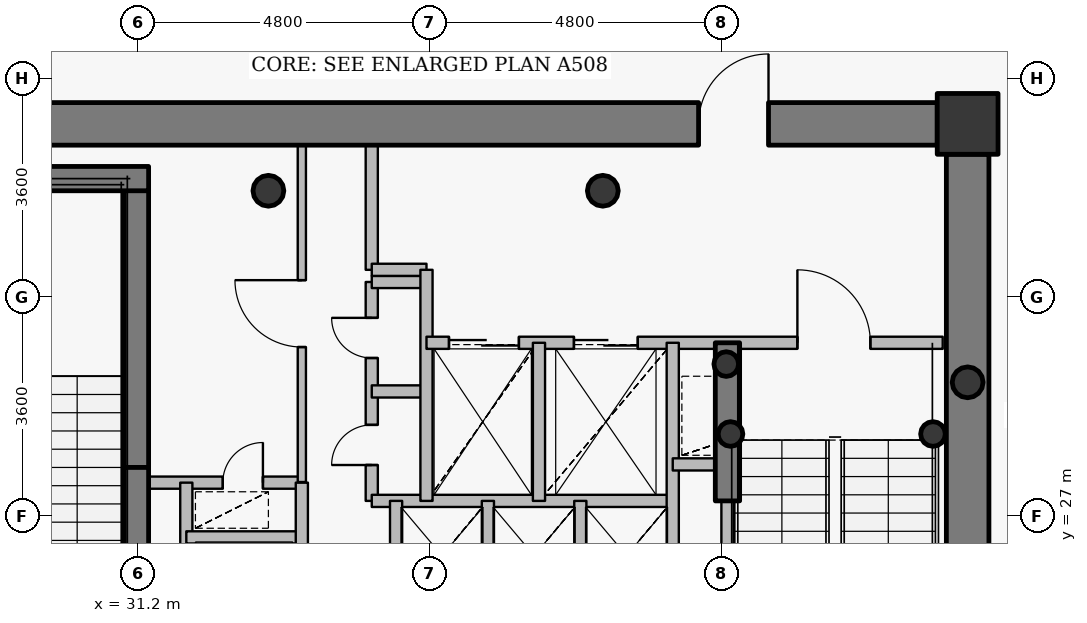
"""IFC4 building model, lengths in metres.
Left out: names, types, materials, properties, quantities, classifications, styles, units other than length and angle.
Written with IfcOpenShell. Run it as: python <this file> out.ifc"""

import sys

from ifc_helpers import new_model, si_unit, direction, frame, frame_2d, origin, origin_2d, place, context, subcontext, project, spatial, rectangle, hollow_circle, extrude, source, transform, mapped, element, fill, save


model = new_model("IFC4")
c1 = context("Model", 3, precision=1e-05, world=origin(), true_north=direction((0.0, 1.0)))
c2 = subcontext(c1, "Body", "Model", "MODEL_VIEW")
j1 = project(units=[si_unit("LENGTHUNIT", "METRE"), si_unit("PLANEANGLEUNIT", "RADIAN")], contexts=[c1])
p1 = place(None, origin())
s1 = spatial("IfcSite", under=j1, at=p1, CompositionType="ELEMENT")
p2 = place(p1, origin())
s2 = spatial("IfcBuilding", under=s1, at=p2, CompositionType="ELEMENT")
p3 = place(p2, frame((0.0, 0.0, 306.75)))
s3 = spatial("IfcBuildingStorey", under=s2, at=p3, CompositionType="ELEMENT", Elevation=306.75)
p4 = place(p3, frame((44.85, 33.45, 0.0), z_axis=(0.0, 0.0, 1.0), x_axis=(1.0, 0.0, 0.0)))
e1 = element("IfcColumn", 1, at=p4, inside=s3, PredefinedType="COLUMN", context=c2, shape_type="SweptSolid", body=[
    extrude(rectangle(XDim=1.0, YDim=1.0, at=origin_2d()), origin(), (0.0, 0.0, 1.0), 3.75),
])
for number, where, z_axis, x_axis in (
    (2, (38.85, 32.35, 0.0), (0.0, 0.0, 1.0), (1.0, 0.0, 0.0)),
    (3, (33.35, 32.35, 0.0), (0.0, 0.0, 1.0), (1.0, 0.0, 0.0)),
):
    element("IfcColumn", number, at=place(p3, frame(where, z_axis=z_axis, x_axis=x_axis)), inside=s3, PredefinedType="COLUMN", context=c2, shape_type="SweptSolid", body=[
        extrude(hollow_circle(Radius=0.254, WallThickness=0.02, at=origin_2d()), origin(), (0.0, 0.0, 1.0), 3.75),
    ])
p5 = place(p3, frame((31.18, 27.8, 0.0), z_axis=(0.0, 0.0, 1.0), x_axis=(0.0, 1.0, 0.0)))
e4 = element("IfcWall", 4, at=p5, inside=s3, PredefinedType="SHEAR", context=c2, shape_type="SweptSolid", body=[
    extrude(rectangle(XDim=4.75, YDim=0.4, at=frame_2d((2.375, 0.0))), origin(), (0.0, 0.0, 1.0), 3.75),
])
p6 = place(p3, frame((27.25, 32.55, 0.0), z_axis=(0.0, 0.0, 1.0), x_axis=(1.0, 0.0, 0.0)))
e5 = element("IfcWall", 5, at=p6, inside=s3, PredefinedType="SHEAR", context=c2, shape_type="SweptSolid", body=[
    extrude(rectangle(XDim=4.13, YDim=0.4, at=frame_2d((2.065, 0.0))), origin(), (0.0, 0.0, 1.0), 3.75),
])
for number, where, z_axis, x_axis in (
    (6, (40.95, 28.35, 0.0), (0.0, 0.0, 1.0), (1.0, 0.0, 0.0)),
    (7, (44.28, 28.35, 0.0), (0.0, 0.0, 1.0), (1.0, 0.0, 0.0)),
    (8, (40.88, 29.5, 0.0), (0.0, 0.0, 1.0), (1.0, 0.0, 0.0)),
):
    element("IfcColumn", number, at=place(p3, frame(where, z_axis=z_axis, x_axis=x_axis)), inside=s3, PredefinedType="COLUMN", context=c2, shape_type="SweptSolid", body=[
        extrude(hollow_circle(Radius=0.203, WallThickness=0.016, at=origin_2d()), origin(), (0.0, 0.0, 1.0), 3.75),
    ])
p7 = place(p3, frame((27.65, 33.45, 0.0), z_axis=(0.0, 0.0, 1.0), x_axis=(1.0, 0.0, 0.0)))
e9 = element("IfcWall", 9, at=p7, inside=s3, PredefinedType="SHEAR", context=c2, shape_type="SweptSolid", body=[
    extrude(rectangle(XDim=16.7, YDim=0.7, at=frame_2d((8.35, 0.0))), origin(), (0.0, 0.0, 1.0), 3.05),
])
p8 = place(p7, frame((12.775, 0.0, 0.0)))
e10 = element("IfcOpeningElement", 10, at=p8, cuts=e9, PredefinedType="OPENING", context=c2, shape_type="SweptSolid", body=[
    extrude(rectangle(XDim=1.15, YDim=2.15, at=origin_2d()), frame((0.575, 0.36, 1.075), z_axis=(0.0, -1.0, 0.0), x_axis=(1.0, 0.0, 0.0)), (0.0, 0.0, 1.0), 0.72),
])
p9 = place(p3, frame((44.85, 32.95, 0.0), z_axis=(0.0, 0.0, 1.0), x_axis=(0.0, -1.0, 0.0)))
e11 = element("IfcWall", 11, at=p9, inside=s3, PredefinedType="SHEAR", context=c2, shape_type="SweptSolid", body=[
    extrude(rectangle(XDim=11.9, YDim=0.7, at=frame_2d((5.95, 0.0))), origin(), (0.0, 0.0, 1.0), 3.05),
])
p10 = place(p3, frame((31.18, 25.55, 0.0), z_axis=(0.0, 0.0, 1.0), x_axis=(0.0, 1.0, 0.0)))
e12 = element("IfcWall", 12, at=p10, inside=s3, PredefinedType="SHEAR", context=c2, shape_type="SweptSolid", body=[
    extrude(rectangle(XDim=2.25, YDim=0.4, at=frame_2d((1.125, 0.0))), origin(), (0.0, 0.0, 1.0), 3.1),
])
p11 = place(p3, frame((40.9, 27.25, 0.0), z_axis=(0.0, 0.0, 1.0), x_axis=(0.0, 1.0, 0.0)))
e13 = element("IfcWall", 13, at=p11, inside=s3, PredefinedType="SHEAR", context=c2, shape_type="SweptSolid", body=[
    extrude(rectangle(XDim=2.6, YDim=0.4, at=frame_2d((1.3, 0.0))), origin(), (0.0, 0.0, 1.0), 3.1),
])
p12 = place(p3, frame((44.85, 29.2, 0.0), z_axis=(0.0, 0.0, 1.0), x_axis=(1.0, 0.0, 0.0)))
e14 = element("IfcColumn", 14, at=p12, inside=s3, PredefinedType="COLUMN", context=c2, shape_type="SweptSolid", body=[
    extrude(hollow_circle(Radius=0.254, WallThickness=0.02, at=origin_2d()), origin(), (0.0, 0.0, 1.0), 3.75),
])
p13 = place(p3, frame((31.1, 27.55, 0.0), z_axis=(0.0, 0.0, 1.0), x_axis=(1.0, 0.0, 0.0)))
e15 = element("IfcWall", 15, at=p13, inside=s3, PredefinedType="PARTITIONING", context=c2, shape_type="SweptSolid", body=[
    extrude(rectangle(XDim=2.8, YDim=0.2, at=frame_2d((1.4, 0.0))), origin(), (0.0, 0.0, 1.0), 3.085),
])
p14 = place(p13, frame((1.5, 0.0, 0.0)))
e16 = element("IfcOpeningElement", 16, at=p14, cuts=e15, PredefinedType="OPENING", context=c2, shape_type="SweptSolid", body=[
    extrude(rectangle(XDim=0.66, YDim=2.05, at=origin_2d()), frame((0.33, 0.11, 1.025), z_axis=(0.0, -1.0, 0.0), x_axis=(1.0, 0.0, 0.0)), (0.0, 0.0, 1.0), 0.22),
])
p15 = place(p3, frame((32.0, 24.1, 0.0), z_axis=(0.0, 0.0, 1.0), x_axis=(0.0, 1.0, 0.0)))
e17 = element("IfcWall", 17, at=p15, inside=s3, PredefinedType="PARTITIONING", context=c2, shape_type="SweptSolid", body=[
    extrude(rectangle(XDim=3.45, YDim=0.2, at=frame_2d((1.725, 0.0))), origin(), (0.0, 0.0, 1.0), 3.5),
])
p16 = place(p3, frame((32.0, 26.65, 0.0), z_axis=(0.0, 0.0, 1.0), x_axis=(1.0, 0.0, 0.0)))
e18 = element("IfcWall", 18, at=p16, inside=s3, PredefinedType="PARTITIONING", context=c2, shape_type="SweptSolid", body=[
    extrude(rectangle(XDim=1.9, YDim=0.2, at=frame_2d((0.95, 0.0))), origin(), (0.0, 0.0, 1.0), 3.085),
])
p17 = place(p3, frame((33.9, 20.9, 0.0), z_axis=(0.0, 0.0, 1.0), x_axis=(0.0, 1.0, 0.0)))
e19 = element("IfcWall", 19, at=p17, inside=s3, PredefinedType="PARTITIONING", context=c2, shape_type="SweptSolid", body=[
    extrude(rectangle(XDim=6.65, YDim=0.2, at=frame_2d((3.325, 0.0))), origin(), (0.0, 0.0, 1.0), 3.085),
])
p18 = place(p3, frame((33.9, 27.56, 0.0), z_axis=(0.0, 0.0, 1.0), x_axis=(0.0, 1.0, 0.0)))
e20 = element("IfcWall", 20, at=p18, inside=s3, PredefinedType="PARTITIONING", context=c2, shape_type="SweptSolid", body=[
    extrude(rectangle(XDim=5.54, YDim=0.135, at=frame_2d((2.77, 0.0))), origin(), (0.0, 0.0, 1.0), 3.085),
])
p19 = place(p18, frame((2.22, 0.0, 0.0)))
e21 = element("IfcOpeningElement", 21, at=p19, cuts=e20, PredefinedType="OPENING", context=c2, shape_type="SweptSolid", body=[
    extrude(rectangle(XDim=1.1, YDim=2.15, at=origin_2d()), frame((0.55, 0.078, 1.075), z_axis=(0.0, -1.0, 0.0), x_axis=(1.0, 0.0, 0.0)), (0.0, 0.0, 1.0), 0.155),
])
p20 = place(p3, frame((35.05, 27.25, 0.0), z_axis=(0.0, 0.0, 1.0), x_axis=(0.0, 1.0, 0.0)))
e22 = element("IfcWall", 22, at=p20, inside=s3, PredefinedType="PARTITIONING", context=c2, shape_type="SweptSolid", body=[
    extrude(rectangle(XDim=3.6, YDim=0.2, at=frame_2d((1.8, 0.0))), origin(), (0.0, 0.0, 1.0), 3.5),
])
p21 = place(p20, frame((0.59, 0.0, 0.0)))
e23 = element("IfcOpeningElement", 23, at=p21, cuts=e22, PredefinedType="OPENING", context=c2, shape_type="SweptSolid", body=[
    extrude(rectangle(XDim=0.66, YDim=2.05, at=origin_2d()), frame((0.33, 0.11, 1.025), z_axis=(0.0, -1.0, 0.0), x_axis=(1.0, 0.0, 0.0)), (0.0, 0.0, 1.0), 0.22),
])
p22 = place(p20, frame((2.35, 0.0, 0.0)))
e24 = element("IfcOpeningElement", 24, at=p22, cuts=e22, PredefinedType="OPENING", context=c2, shape_type="SweptSolid", body=[
    extrude(rectangle(XDim=0.66, YDim=2.05, at=origin_2d()), frame((0.33, 0.11, 1.025), z_axis=(0.0, -1.0, 0.0), x_axis=(1.0, 0.0, 0.0)), (0.0, 0.0, 1.0), 0.22),
])
p23 = place(p3, frame((35.05, 27.25, 0.0), z_axis=(0.0, 0.0, 1.0), x_axis=(1.0, 0.0, 0.0)))
e25 = element("IfcWall", 25, at=p23, inside=s3, PredefinedType="PARTITIONING", context=c2, shape_type="SweptSolid", body=[
    extrude(rectangle(XDim=4.95, YDim=0.2, at=frame_2d((2.475, 0.0))), origin(), (0.0, 0.0, 1.0), 3.085),
])
for number, where, z_axis, x_axis in (
    (26, (35.05, 29.05, 0.0), (0.0, 0.0, 1.0), (1.0, 0.0, 0.0)),
    (27, (35.05, 30.85, 0.0), (0.0, 0.0, 1.0), (1.0, 0.0, 0.0)),
):
    element("IfcWall", number, at=place(p3, frame(where, z_axis=z_axis, x_axis=x_axis)), inside=s3, PredefinedType="PARTITIONING", context=c2, shape_type="SweptSolid", body=[
        extrude(rectangle(XDim=0.9, YDim=0.2, at=frame_2d((0.45, 0.0))), origin(), (0.0, 0.0, 1.0), 3.5),
    ])
p24 = place(p3, frame((35.05, 31.05, 0.0), z_axis=(0.0, 0.0, 1.0), x_axis=(0.0, 1.0, 0.0)))
e28 = element("IfcWall", 28, at=p24, inside=s3, PredefinedType="PARTITIONING", context=c2, shape_type="SweptSolid", body=[
    extrude(rectangle(XDim=2.05, YDim=0.2, at=frame_2d((1.025, 0.0))), origin(), (0.0, 0.0, 1.0), 3.085),
])
p25 = place(p3, frame((35.05, 31.05, 0.0), z_axis=(0.0, 0.0, 1.0), x_axis=(1.0, 0.0, 0.0)))
e29 = element("IfcWall", 29, at=p25, inside=s3, PredefinedType="PARTITIONING", context=c2, shape_type="SweptSolid", body=[
    extrude(rectangle(XDim=0.9, YDim=0.2, at=frame_2d((0.45, 0.0))), origin(), (0.0, 0.0, 1.0), 3.5),
])
p26 = place(p3, frame((35.45, 25.45, 0.0), z_axis=(0.0, 0.0, 1.0), x_axis=(0.0, 1.0, 0.0)))
e30 = element("IfcWall", 30, at=p26, inside=s3, PredefinedType="PARTITIONING", context=c2, shape_type="SweptSolid", body=[
    extrude(rectangle(XDim=1.8, YDim=0.2, at=frame_2d((0.9, 0.0))), origin(), (0.0, 0.0, 1.0), 3.5),
])
p27 = place(p3, frame((35.95, 27.25, 0.0), z_axis=(0.0, 0.0, 1.0), x_axis=(0.0, 1.0, 0.0)))
e31 = element("IfcWall", 31, at=p27, inside=s3, PredefinedType="PARTITIONING", context=c2, shape_type="SweptSolid", body=[
    extrude(rectangle(XDim=3.8, YDim=0.2, at=frame_2d((1.9, 0.0))), origin(), (0.0, 0.0, 1.0), 3.5),
])
p28 = place(p3, frame((35.95, 29.85, 0.0), z_axis=(0.0, 0.0, 1.0), x_axis=(1.0, 0.0, 0.0)))
e32 = element("IfcWall", 32, at=p28, inside=s3, PredefinedType="PARTITIONING", context=c2, shape_type="SweptSolid", body=[
    extrude(rectangle(XDim=8.49, YDim=0.2, at=frame_2d((4.245, 0.0))), origin(), (0.0, 0.0, 1.0), 3.085),
])
p29 = place(p28, frame((6.1, 0.0, 0.0)))
e33 = element("IfcOpeningElement", 33, at=p29, cuts=e32, PredefinedType="OPENING", context=c2, shape_type="SweptSolid", body=[
    extrude(rectangle(XDim=1.2, YDim=2.15, at=origin_2d()), frame((0.6, 0.11, 1.075), z_axis=(0.0, -1.0, 0.0), x_axis=(1.0, 0.0, 0.0)), (0.0, 0.0, 1.0), 0.22),
])
p30 = place(p28, frame((0.37, 0.0, 0.0)))
e34 = element("IfcOpeningElement", 34, at=p30, cuts=e32, PredefinedType="OPENING", context=c2, shape_type="SweptSolid", body=[
    extrude(rectangle(XDim=1.15, YDim=2.15, at=origin_2d()), frame((0.575, 0.11, 1.075), z_axis=(0.0, -1.0, 0.0), x_axis=(1.0, 0.0, 0.0)), (0.0, 0.0, 1.0), 0.22),
])
p31 = place(p28, frame((2.425, 0.0, 0.0)))
e35 = element("IfcOpeningElement", 35, at=p31, cuts=e32, PredefinedType="OPENING", context=c2, shape_type="SweptSolid", body=[
    extrude(rectangle(XDim=1.05, YDim=2.15, at=origin_2d()), frame((0.525, 0.11, 1.075), z_axis=(0.0, -1.0, 0.0), x_axis=(1.0, 0.0, 0.0)), (0.0, 0.0, 1.0), 0.22),
])
p32 = place(p3, frame((36.96, 25.45, 0.0), z_axis=(0.0, 0.0, 1.0), x_axis=(0.0, 1.0, 0.0)))
e36 = element("IfcWall", 36, at=p32, inside=s3, PredefinedType="PARTITIONING", context=c2, shape_type="SweptSolid", body=[
    extrude(rectangle(XDim=1.8, YDim=0.2, at=frame_2d((0.9, 0.0))), origin(), (0.0, 0.0, 1.0), 3.5),
])
p33 = place(p3, frame((37.8, 27.25, 0.0), z_axis=(0.0, 0.0, 1.0), x_axis=(0.0, 1.0, 0.0)))
e37 = element("IfcWall", 37, at=p33, inside=s3, PredefinedType="PARTITIONING", context=c2, shape_type="SweptSolid", body=[
    extrude(rectangle(XDim=2.6, YDim=0.2, at=frame_2d((1.3, 0.0))), origin(), (0.0, 0.0, 1.0), 3.5),
])
p34 = place(p3, frame((38.48, 25.45, 0.0), z_axis=(0.0, 0.0, 1.0), x_axis=(0.0, 1.0, 0.0)))
e38 = element("IfcWall", 38, at=p34, inside=s3, PredefinedType="PARTITIONING", context=c2, shape_type="SweptSolid", body=[
    extrude(rectangle(XDim=1.8, YDim=0.2, at=frame_2d((0.9, 0.0))), origin(), (0.0, 0.0, 1.0), 3.5),
])
p35 = place(p3, frame((40.0, 25.45, 0.0), z_axis=(0.0, 0.0, 1.0), x_axis=(0.0, 1.0, 0.0)))
e39 = element("IfcWall", 39, at=p35, inside=s3, PredefinedType="PARTITIONING", context=c2, shape_type="SweptSolid", body=[
    extrude(rectangle(XDim=4.4, YDim=0.2, at=frame_2d((2.2, 0.0))), origin(), (0.0, 0.0, 1.0), 3.5),
])
p36 = place(p3, frame((40.0, 27.85, 0.0), z_axis=(0.0, 0.0, 1.0), x_axis=(1.0, 0.0, 0.0)))
e40 = element("IfcWall", 40, at=p36, inside=s3, PredefinedType="PARTITIONING", context=c2, shape_type="SweptSolid", body=[
    extrude(rectangle(XDim=0.9, YDim=0.2, at=frame_2d((0.45, 0.0))), origin(), (0.0, 0.0, 1.0), 3.5),
])
p37 = place(p3, frame((40.9, 21.33, 0.0), z_axis=(0.0, 0.0, 1.0), x_axis=(0.0, 1.0, 0.0)))
e41 = element("IfcWall", 41, at=p37, inside=s3, PredefinedType="PARTITIONING", context=c2, shape_type="SweptSolid", body=[
    extrude(rectangle(XDim=5.91, YDim=0.2, at=frame_2d((2.955, 0.0))), origin(), (0.0, 0.0, 1.0), 3.035),
])
p38 = place(p3, frame((45.2, 33.8, 0.0), z_axis=(0.0, 0.0, 1.0), x_axis=(-1.0, 0.0, 0.0)))
e42 = element("IfcWall", 42, at=p38, inside=s3, PredefinedType="PARTITIONING", context=c2, shape_type="SweptSolid", body=[
    extrude(rectangle(XDim=0.84, YDim=0.135, at=frame_2d((0.42, 0.0))), origin(), (0.0, 0.0, 1.0), 3.035),
])
p39 = place(p3, frame((45.2, 32.96, 0.0), z_axis=(0.0, 0.0, 1.0), x_axis=(0.0, 1.0, 0.0)))
e43 = element("IfcWall", 43, at=p39, inside=s3, PredefinedType="PARTITIONING", context=c2, shape_type="SweptSolid", body=[
    extrude(rectangle(XDim=0.532, YDim=0.135, at=frame_2d((0.266, 0.0))), origin(), (0.0, 0.0, 1.0), 3.5),
])
m1 = source(origin(), c2, "Body", "SweptSolid", [
    extrude(rectangle(XDim=1.15, YDim=2.15, at=origin_2d()), frame((0.575, 0.025, 1.075), z_axis=(0.0, -1.0, 0.0), x_axis=(1.0, 0.0, 0.0)), (0.0, 0.0, 1.0), 0.05),
])
p40 = place(p8, origin())
e44 = element("IfcDoor", 44, at=p40, inside=s3, OperationType="SINGLE_SWING_RIGHT", PredefinedType="DOOR", context=c2, shape_type="MappedRepresentation", body=[
    mapped(m1, transform((0.0, 0.0, 0.0), x_axis=(1.0, 0.0, 0.0), y_axis=(0.0, 1.0, 0.0), z_axis=(0.0, 0.0, 1.0), scale=1.0)),
])
fill(e10, e44)
m2 = source(origin(), c2, "Body", "SweptSolid", [
    extrude(rectangle(XDim=1.2, YDim=2.15, at=origin_2d()), frame((0.6, 0.025, 1.075), z_axis=(0.0, -1.0, 0.0), x_axis=(1.0, 0.0, 0.0)), (0.0, 0.0, 1.0), 0.05),
])
p41 = place(p29, origin())
e45 = element("IfcDoor", 45, at=p41, inside=s3, OperationType="SINGLE_SWING_LEFT", PredefinedType="DOOR", context=c2, shape_type="MappedRepresentation", body=[
    mapped(m2, transform((0.0, 0.0, 0.0), x_axis=(1.0, 0.0, 0.0), y_axis=(0.0, 1.0, 0.0), z_axis=(0.0, 0.0, 1.0), scale=1.0)),
])
fill(e33, e45)
m3 = source(origin(), c2, "Body", "SweptSolid", [
    extrude(rectangle(XDim=1.15, YDim=2.15, at=origin_2d()), frame((0.575, 0.025, 1.075), z_axis=(0.0, -1.0, 0.0), x_axis=(1.0, 0.0, 0.0)), (0.0, 0.0, 1.0), 0.05),
])
p42 = place(p30, origin())
e46 = element("IfcDoor", 46, at=p42, inside=s3, OperationType="DOUBLE_DOOR_SLIDING", PredefinedType="USERDEFINED", context=c2, shape_type="MappedRepresentation", body=[
    mapped(m3, transform((0.0, 0.0, 0.0), x_axis=(1.0, 0.0, 0.0), y_axis=(0.0, 1.0, 0.0), z_axis=(0.0, 0.0, 1.0), scale=1.0)),
])
fill(e34, e46)
m4 = source(origin(), c2, "Body", "SweptSolid", [
    extrude(rectangle(XDim=1.05, YDim=2.15, at=origin_2d()), frame((0.525, 0.025, 1.075), z_axis=(0.0, -1.0, 0.0), x_axis=(1.0, 0.0, 0.0)), (0.0, 0.0, 1.0), 0.05),
])
p43 = place(p31, origin())
e47 = element("IfcDoor", 47, at=p43, inside=s3, OperationType="DOUBLE_DOOR_SLIDING", PredefinedType="USERDEFINED", context=c2, shape_type="MappedRepresentation", body=[
    mapped(m4, transform((0.0, 0.0, 0.0), x_axis=(1.0, 0.0, 0.0), y_axis=(0.0, 1.0, 0.0), z_axis=(0.0, 0.0, 1.0), scale=1.0)),
])
fill(e35, e47)
m5 = source(origin(), c2, "Body", "SweptSolid", [
    extrude(rectangle(XDim=0.66, YDim=2.05, at=origin_2d()), frame((0.33, 0.025, 1.025), z_axis=(0.0, -1.0, 0.0), x_axis=(1.0, 0.0, 0.0)), (0.0, 0.0, 1.0), 0.05),
])
p44 = place(p21, origin())
e48 = element("IfcDoor", 48, at=p44, inside=s3, OperationType="SINGLE_SWING_LEFT", PredefinedType="USERDEFINED", context=c2, shape_type="MappedRepresentation", body=[
    mapped(m5, transform((0.0, 0.0, 0.0), x_axis=(1.0, 0.0, 0.0), y_axis=(0.0, 1.0, 0.0), z_axis=(0.0, 0.0, 1.0), scale=1.0)),
])
fill(e23, e48)
p45 = place(p22, origin())
e49 = element("IfcDoor", 49, at=p45, inside=s3, OperationType="SINGLE_SWING_RIGHT", PredefinedType="USERDEFINED", context=c2, shape_type="MappedRepresentation", body=[
    mapped(m5, transform((0.0, 0.0, 0.0), x_axis=(1.0, 0.0, 0.0), y_axis=(0.0, 1.0, 0.0), z_axis=(0.0, 0.0, 1.0), scale=1.0)),
])
fill(e24, e49)
m6 = source(origin(), c2, "Body", "SweptSolid", [
    extrude(rectangle(XDim=1.1, YDim=2.15, at=origin_2d()), frame((0.55, 0.025, 1.075), z_axis=(0.0, -1.0, 0.0), x_axis=(1.0, 0.0, 0.0)), (0.0, 0.0, 1.0), 0.05),
])
p46 = place(p19, origin())
e50 = element("IfcDoor", 50, at=p46, inside=s3, OperationType="SINGLE_SWING_RIGHT", PredefinedType="DOOR", context=c2, shape_type="MappedRepresentation", body=[
    mapped(m6, transform((0.0, 0.0, 0.0), x_axis=(1.0, 0.0, 0.0), y_axis=(0.0, 1.0, 0.0), z_axis=(0.0, 0.0, 1.0), scale=1.0)),
])
fill(e21, e50)
p47 = place(p14, origin())
e51 = element("IfcDoor", 51, at=p47, inside=s3, OperationType="SINGLE_SWING_RIGHT", PredefinedType="USERDEFINED", context=c2, shape_type="MappedRepresentation", body=[
    mapped(m5, transform((0.0, 0.0, 0.0), x_axis=(1.0, 0.0, 0.0), y_axis=(0.0, 1.0, 0.0), z_axis=(0.0, 0.0, 1.0), scale=1.0)),
])
fill(e16, e51)
save(model, sys.argv[1])
